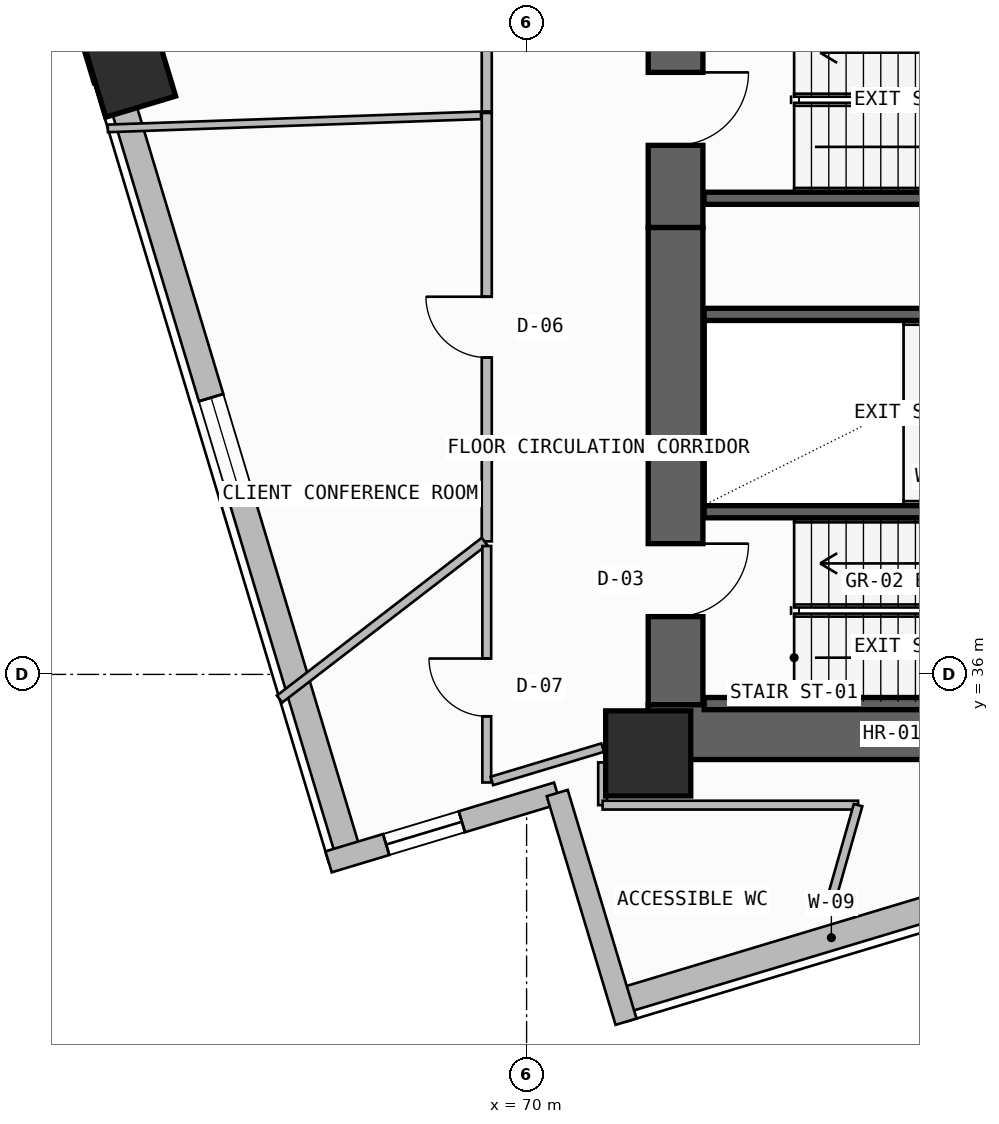
"""IFC4 building model, lengths in metres.
Left out: names, types, materials, properties, quantities, classifications, styles, units other than length and angle.
Written with IfcOpenShell. Run it as: python <this file> out.ifc"""

import sys

from ifc_helpers import new_model, si_unit, direction, frame, frame_2d, origin, origin_2d, place, context, subcontext, project, spatial, rectangle, extrude, element, fill, save


model = new_model("IFC4")
c1 = context("Model", 3, precision=1e-05, world=origin(), true_north=direction((0.0, 1.0)))
c2 = subcontext(c1, "Body", "Model", "MODEL_VIEW")
j1 = project(units=[si_unit("LENGTHUNIT", "METRE"), si_unit("PLANEANGLEUNIT", "RADIAN")], contexts=[c1])
p1 = place(None, origin())
s1 = spatial("IfcSite", under=j1, at=p1, CompositionType="ELEMENT")
p2 = place(p1, origin())
s2 = spatial("IfcBuilding", under=s1, at=p2, CompositionType="ELEMENT")
p3 = place(p2, frame((0.0, 0.0, 143.1)))
s3 = spatial("IfcBuildingStorey", under=s2, at=p3, CompositionType="ELEMENT", Elevation=143.1)
p4 = place(p3, frame((72.45, 35.5, -0.26), z_axis=(0.0, 0.0, 1.0), x_axis=(0.0, 1.0, 0.0)))
e1 = element("IfcWall", 1, at=p4, inside=s3, PredefinedType="SHEAR", context=c2, shape_type="SweptSolid", body=[
    extrude(rectangle(XDim=7.85, YDim=0.9, at=frame_2d((3.925, 0.0))), origin(), (0.0, 0.0, 1.0), 3.6),
])
p5 = place(p4, frame((1.45, 0.0, 0.26)))
e2 = element("IfcOpeningElement", 2, at=p5, cuts=e1, PredefinedType="OPENING", context=c2, shape_type="SweptSolid", body=[
    extrude(rectangle(XDim=1.2, YDim=2.2, at=frame_2d((0.6, 1.1))), frame((0.0, 0.46, 0.0), z_axis=(0.0, -1.0, 0.0), x_axis=(1.0, 0.0, 0.0)), (0.0, 0.0, 1.0), 0.92),
])
p6 = place(p3, frame((72.0, 35.05, -0.26), z_axis=(0.0, 0.0, 1.0), x_axis=(1.0, 0.0, 0.0)))
e3 = element("IfcWall", 3, at=p6, inside=s3, PredefinedType="SHEAR", context=c2, shape_type="SweptSolid", body=[
    extrude(rectangle(XDim=13.9, YDim=0.9, at=frame_2d((6.95, 0.0))), origin(), (0.0, 0.0, 1.0), 3.6),
])
p7 = place(p3, frame((72.45, 43.35, -0.26), z_axis=(0.0, 0.0, 1.0), x_axis=(0.0, 1.0, 0.0)))
e4 = element("IfcWall", 4, at=p7, inside=s3, PredefinedType="SHEAR", context=c2, shape_type="SweptSolid", body=[
    extrude(rectangle(XDim=12.7, YDim=0.9, at=frame_2d((6.35, 0.0))), origin(), (0.0, 0.0, 1.0), 3.6),
])
p8 = place(p7, frame((1.35, 0.0, 0.26)))
e5 = element("IfcOpeningElement", 5, at=p8, cuts=e4, PredefinedType="OPENING", context=c2, shape_type="SweptSolid", body=[
    extrude(rectangle(XDim=1.2, YDim=2.2, at=frame_2d((0.6, 1.1))), frame((0.0, 0.46, 0.0), z_axis=(0.0, -1.0, 0.0), x_axis=(1.0, 0.0, 0.0)), (0.0, 0.0, 1.0), 0.92),
])
p9 = place(p3, frame((72.0, 34.7, 0.0), z_axis=(0.0, 0.0, 1.0), x_axis=(1.0, 0.0, 0.0)))
e6 = element("IfcColumn", 6, at=p9, inside=s3, PredefinedType="COLUMN", context=c2, shape_type="SweptSolid", body=[
    extrude(rectangle(XDim=1.4, YDim=1.4, at=origin_2d()), origin(), (0.0, 0.0, 1.0), 3.6),
])
p10 = place(p3, frame((63.48, 45.912, 0.0), z_axis=(0.0, 0.0, 1.0), x_axis=(-0.288196268134, 0.957571360805, 0.0)))
e7 = element("IfcColumn", 7, at=p10, inside=s3, PredefinedType="COLUMN", context=c2, shape_type="SweptSolid", body=[
    extrude(rectangle(XDim=1.2, YDim=1.2, at=origin_2d()), origin(), (0.0, 0.0, 1.0), 3.6),
])
p11 = place(p3, frame((71.535, 30.624, 0.0), z_axis=(0.0, 0.0, 1.0), x_axis=(0.957571099539, 0.288197136226, 0.0)))
e8 = element("IfcWall", 8, at=p11, inside=s3, PredefinedType="SOLIDWALL", context=c2, shape_type="SweptSolid", body=[
    extrude(rectangle(XDim=12.236, YDim=0.42, at=frame_2d((6.118, 0.0))), origin(), (0.0, 0.0, 1.0), 3.34),
])
p12 = place(p11, frame((7.264, 0.0, 1.2)))
e9 = element("IfcOpeningElement", 9, at=p12, cuts=e8, PredefinedType="OPENING", context=c2, shape_type="SweptSolid", body=[
    extrude(rectangle(XDim=2.4, YDim=0.9, at=frame_2d((1.2, 0.45))), frame((0.0, 0.22, 0.0), z_axis=(0.0, -1.0, 0.0), x_axis=(1.0, 0.0, 0.0)), (0.0, 0.0, 1.0), 0.44),
])
p13 = place(p3, frame((57.323, 65.434, -0.26), z_axis=(0.0, 0.0, 1.0), x_axis=(0.288188159352, -0.957573801234, 0.0)))
e10 = element("IfcWall", 10, at=p13, inside=s3, PredefinedType="SHEAR", context=c2, shape_type="SweptSolid", body=[
    extrude(rectangle(XDim=20.469, YDim=0.7, at=frame_2d((10.234, 0.0))), origin(), (0.0, 0.0, 1.0), 3.6),
])
p14 = place(p13, frame((15.3, 0.0, 1.2)))
e11 = element("IfcOpeningElement", 11, at=p14, cuts=e10, PredefinedType="OPENING", context=c2, shape_type="SweptSolid", body=[
    extrude(rectangle(XDim=1.8, YDim=0.9, at=frame_2d((0.9, 0.45))), frame((0.0, 0.36, 0.0), z_axis=(0.0, -1.0, 0.0), x_axis=(1.0, 0.0, 0.0)), (0.0, 0.0, 1.0), 0.72),
])
p15 = place(p3, frame((63.221, 45.834, 0.0), z_axis=(0.0, 0.0, 1.0), x_axis=(0.288202962273, -0.957569346072, 0.0)))
e12 = element("IfcWall", 12, at=p15, inside=s3, PredefinedType="SOLIDWALL", context=c2, shape_type="SweptSolid", body=[
    extrude(rectangle(XDim=13.384, YDim=0.42, at=frame_2d((6.692, 0.0))), origin(), (0.0, 0.0, 1.0), 2.725),
])
p16 = place(p15, frame((5.517, 0.0, 1.2)))
e13 = element("IfcOpeningElement", 13, at=p16, cuts=e12, PredefinedType="OPENING", context=c2, shape_type="SweptSolid", body=[
    extrude(rectangle(XDim=1.8, YDim=0.9, at=frame_2d((0.9, 0.45))), frame((0.0, 0.22, 0.0), z_axis=(0.0, -1.0, 0.0), x_axis=(1.0, 0.0, 0.0)), (0.0, 0.0, 1.0), 0.44),
])
p17 = place(p3, frame((66.743, 32.917, 0.0), z_axis=(0.0, 0.0, 1.0), x_axis=(0.957584687378, 0.288151985068, 0.0)))
e14 = element("IfcWall", 14, at=p17, inside=s3, PredefinedType="SOLIDWALL", context=c2, shape_type="SweptSolid", body=[
    extrude(rectangle(XDim=3.927, YDim=0.36, at=frame_2d((1.963, 0.0))), origin(), (0.0, 0.0, 1.0), 3.34),
])
p18 = place(p17, frame((0.989, 0.0, 0.45)))
e15 = element("IfcOpeningElement", 15, at=p18, cuts=e14, PredefinedType="OPENING", context=c2, shape_type="SweptSolid", body=[
    extrude(rectangle(XDim=1.3, YDim=2.4, at=frame_2d((0.65, 1.2))), frame((0.0, 0.19, 0.0), z_axis=(0.0, -1.0, 0.0), x_axis=(1.0, 0.0, 0.0)), (0.0, 0.0, 1.0), 0.38),
])
p19 = place(p3, frame((70.504, 34.049, 0.0), z_axis=(0.0, 0.0, 1.0), x_axis=(0.288169140251, -0.957579524952, 0.0)))
e16 = element("IfcWall", 16, at=p19, inside=s3, PredefinedType="SOLIDWALL", context=c2, shape_type="SweptSolid", body=[
    extrude(rectangle(XDim=3.927, YDim=0.36, at=frame_2d((1.963, 0.0))), origin(), (0.0, 0.0, 1.0), 3.34),
])
for number, where, z_axis, x_axis in (
    (17, (72.92, 35.52, -0.26), (0.0, 0.0, 1.0), (1.0, 0.0, 0.0)),
    (18, (72.92, 38.675, -0.26), (0.0, 0.0, 1.0), (1.0, 0.0, 0.0)),
):
    element("IfcWall", number, at=place(p3, frame(where, z_axis=z_axis, x_axis=x_axis)), inside=s3, PredefinedType="SOLIDWALL", context=c2, shape_type="SweptSolid", body=[
        extrude(rectangle(XDim=7.7, YDim=0.2, at=frame_2d((3.85, 0.0))), origin(), (0.0, 0.0, 1.0), 3.6),
    ])
p20 = place(p3, frame((72.92, 41.92, -0.26), z_axis=(0.0, 0.0, 1.0), x_axis=(1.0, 0.0, 0.0)))
e19 = element("IfcWall", 19, at=p20, inside=s3, PredefinedType="SOLIDWALL", context=c2, shape_type="SweptSolid", body=[
    extrude(rectangle(XDim=7.58, YDim=0.2, at=frame_2d((3.79, 0.0))), origin(), (0.0, 0.0, 1.0), 3.6),
])
p21 = place(p3, frame((72.92, 43.83, -0.26), z_axis=(0.0, 0.0, 1.0), x_axis=(1.0, 0.0, 0.0)))
e20 = element("IfcWall", 20, at=p21, inside=s3, PredefinedType="SOLIDWALL", context=c2, shape_type="SweptSolid", body=[
    extrude(rectangle(XDim=7.7, YDim=0.2, at=frame_2d((3.85, 0.0))), origin(), (0.0, 0.0, 1.0), 3.6),
])
p22 = place(p3, frame((69.345, 45.233, 0.0), z_axis=(0.0, 0.0, 1.0), x_axis=(0.0, -1.0, 0.0)))
e21 = element("IfcWall", 21, at=p22, inside=s3, PredefinedType="PARTITIONING", context=c2, shape_type="SweptSolid", body=[
    extrude(rectangle(XDim=7.045, YDim=0.165, at=frame_2d((3.522, 0.0))), origin(), (0.0, 0.0, 1.0), 3.34),
])
p23 = place(p22, frame((3.022, 0.0, 0.0)))
e22 = element("IfcOpeningElement", 22, at=p23, cuts=e21, PredefinedType="OPENING", context=c2, shape_type="SweptSolid", body=[
    extrude(rectangle(XDim=1.0, YDim=2.2, at=frame_2d((0.5, 1.1))), frame((0.0, 0.093, 0.0), z_axis=(0.0, -1.0, 0.0), x_axis=(1.0, 0.0, 0.0)), (0.0, 0.0, 1.0), 0.185),
])
p24 = place(p3, frame((69.307, 38.188, 0.0), z_axis=(0.0, 0.0, 1.0), x_axis=(-0.792406225146, -0.609993749435, 0.0)))
e23 = element("IfcWall", 23, at=p24, inside=s3, PredefinedType="PARTITIONING", context=c2, shape_type="SweptSolid", body=[
    extrude(rectangle(XDim=4.252, YDim=0.145, at=frame_2d((2.126, 0.0))), origin(), (0.0, 0.0, 1.0), 3.34),
])
p25 = place(p3, frame((63.113, 44.979, 0.0), z_axis=(0.0, 0.0, 1.0), x_axis=(0.999389215119, 0.034945624954, 0.0)))
e24 = element("IfcWall", 24, at=p25, inside=s3, PredefinedType="PARTITIONING", context=c2, shape_type="SweptSolid", body=[
    extrude(rectangle(XDim=6.141, YDim=0.125, at=frame_2d((3.07, 0.0))), origin(), (0.0, 0.0, 1.0), 3.34),
])
p26 = place(p3, frame((69.345, 38.111, 0.0), z_axis=(0.0, 0.0, 1.0), x_axis=(0.0, -1.0, 0.0)))
e25 = element("IfcWall", 25, at=p26, inside=s3, PredefinedType="PARTITIONING", context=c2, shape_type="SweptSolid", body=[
    extrude(rectangle(XDim=3.889, YDim=0.145, at=frame_2d((1.944, 0.0))), origin(), (0.0, 0.0, 1.0), 3.34),
])
p27 = place(p26, frame((1.85, 0.0, 0.0)))
e26 = element("IfcOpeningElement", 26, at=p27, cuts=e25, PredefinedType="OPENING", context=c2, shape_type="SweptSolid", body=[
    extrude(rectangle(XDim=0.95, YDim=2.15, at=frame_2d((0.475, 1.075))), frame((0.0, 0.083, 0.0), z_axis=(0.0, -1.0, 0.0), x_axis=(1.0, 0.0, 0.0)), (0.0, 0.0, 1.0), 0.165),
])
p28 = place(p3, frame((69.429, 34.248, 0.0), z_axis=(0.0, 0.0, 1.0), x_axis=(0.957582071772, 0.28816067709, 0.0)))
e27 = element("IfcWall", 27, at=p28, inside=s3, PredefinedType="PARTITIONING", context=c2, shape_type="SweptSolid", body=[
    extrude(rectangle(XDim=1.901, YDim=0.145, at=frame_2d((0.951, 0.0))), origin(), (0.0, 0.0, 1.0), 3.34),
])
p29 = place(p3, frame((69.345, 51.927, 0.0), z_axis=(0.0, 0.0, 1.0), x_axis=(0.0, -1.0, 0.0)))
e28 = element("IfcWall", 28, at=p29, inside=s3, PredefinedType="PARTITIONING", context=c2, shape_type="SweptSolid", body=[
    extrude(rectangle(XDim=6.67, YDim=0.165, at=frame_2d((3.335, 0.0))), origin(), (0.0, 0.0, 1.0), 2.725),
])
p30 = place(p29, frame((2.835, 0.0, 0.0)))
e29 = element("IfcOpeningElement", 29, at=p30, cuts=e28, PredefinedType="OPENING", context=c2, shape_type="SweptSolid", body=[
    extrude(rectangle(XDim=1.0, YDim=2.2, at=frame_2d((0.5, 1.1))), frame((0.0, 0.093, 0.0), z_axis=(0.0, -1.0, 0.0), x_axis=(1.0, 0.0, 0.0)), (0.0, 0.0, 1.0), 0.185),
])
p31 = place(p3, frame((71.25, 34.553, 0.0), z_axis=(0.0, 0.0, 1.0), x_axis=(0.0, -1.0, 0.0)))
e30 = element("IfcWall", 30, at=p31, inside=s3, PredefinedType="PARTITIONING", context=c2, shape_type="SweptSolid", body=[
    extrude(rectangle(XDim=0.703, YDim=0.145, at=frame_2d((0.351, 0.0))), origin(), (0.0, 0.0, 1.0), 3.34),
])
p32 = place(p3, frame((71.25, 33.85, 0.0), z_axis=(0.0, 0.0, 1.0), x_axis=(1.0, 0.0, 0.0)))
e31 = element("IfcWall", 31, at=p32, inside=s3, PredefinedType="PARTITIONING", context=c2, shape_type="SweptSolid", body=[
    extrude(rectangle(XDim=4.201, YDim=0.145, at=frame_2d((2.101, 0.0))), origin(), (0.0, 0.0, 1.0), 3.34),
])
p33 = place(p3, frame((75.451, 33.85, 0.0), z_axis=(0.0, 0.0, 1.0), x_axis=(-0.273017128242, -0.96200917235, 0.0)))
e32 = element("IfcWall", 32, at=p33, inside=s3, PredefinedType="PARTITIONING", context=c2, shape_type="SweptSolid", body=[
    extrude(rectangle(XDim=1.817, YDim=0.145, at=frame_2d((0.909, 0.0))), origin(), (0.0, 0.0, 1.0), 3.34),
])
p34 = place(p16, origin())
e33 = element("IfcWindow", 33, at=p34, inside=s3, PartitioningType="SINGLE_PANEL", PredefinedType="WINDOW", context=c2, shape_type="SweptSolid", body=[
    extrude(rectangle(XDim=1.8, YDim=0.9, at=frame_2d((0.9, 0.45))), frame((0.0, 0.03, 0.0), z_axis=(0.0, -1.0, 0.0), x_axis=(1.0, 0.0, 0.0)), (0.0, 0.0, 1.0), 0.06),
])
fill(e13, e33)
p35 = place(p18, origin())
e34 = element("IfcWindow", 34, at=p35, inside=s3, PartitioningType="SINGLE_PANEL", PredefinedType="WINDOW", context=c2, shape_type="SweptSolid", body=[
    extrude(rectangle(XDim=1.3, YDim=2.4, at=frame_2d((0.65, 1.2))), frame((0.0, 0.03, 0.0), z_axis=(0.0, -1.0, 0.0), x_axis=(1.0, 0.0, 0.0)), (0.0, 0.0, 1.0), 0.06),
])
fill(e15, e34)
p36 = place(p5, frame((1.2, 0.0, 0.0), z_axis=(0.0, 0.0, 1.0), x_axis=(-1.0, 0.0, 0.0)))
e35 = element("IfcDoor", 35, at=p36, inside=s3, OperationType="SINGLE_SWING_LEFT", PredefinedType="USERDEFINED", context=c2, shape_type="SweptSolid", body=[
    extrude(rectangle(XDim=1.2, YDim=2.2, at=frame_2d((0.6, 1.1))), frame((0.0, 0.025, 0.0), z_axis=(0.0, -1.0, 0.0), x_axis=(1.0, 0.0, 0.0)), (0.0, 0.0, 1.0), 0.05),
])
fill(e2, e35)
p37 = place(p8, frame((1.2, 0.0, 0.0), z_axis=(0.0, 0.0, 1.0), x_axis=(-1.0, 0.0, 0.0)))
e36 = element("IfcDoor", 36, at=p37, inside=s3, OperationType="SINGLE_SWING_LEFT", PredefinedType="USERDEFINED", context=c2, shape_type="SweptSolid", body=[
    extrude(rectangle(XDim=1.2, YDim=2.2, at=frame_2d((0.6, 1.1))), frame((0.0, 0.025, 0.0), z_axis=(0.0, -1.0, 0.0), x_axis=(1.0, 0.0, 0.0)), (0.0, 0.0, 1.0), 0.05),
])
fill(e5, e36)
p38 = place(p23, frame((1.0, 0.0, 0.0), z_axis=(0.0, 0.0, 1.0), x_axis=(-1.0, 0.0, 0.0)))
e37 = element("IfcDoor", 37, at=p38, inside=s3, OperationType="SINGLE_SWING_RIGHT", PredefinedType="DOOR", context=c2, shape_type="SweptSolid", body=[
    extrude(rectangle(XDim=1.0, YDim=2.2, at=frame_2d((0.5, 1.1))), frame((0.0, 0.025, 0.0), z_axis=(0.0, -1.0, 0.0), x_axis=(1.0, 0.0, 0.0)), (0.0, 0.0, 1.0), 0.05),
])
fill(e22, e37)
p39 = place(p27, frame((0.95, 0.0, 0.0), z_axis=(0.0, 0.0, 1.0), x_axis=(-1.0, 0.0, 0.0)))
e38 = element("IfcDoor", 38, at=p39, inside=s3, OperationType="SINGLE_SWING_RIGHT", PredefinedType="DOOR", context=c2, shape_type="SweptSolid", body=[
    extrude(rectangle(XDim=0.95, YDim=2.15, at=frame_2d((0.475, 1.075))), frame((0.0, 0.025, 0.0), z_axis=(0.0, -1.0, 0.0), x_axis=(1.0, 0.0, 0.0)), (0.0, 0.0, 1.0), 0.05),
])
fill(e26, e38)
save(model, sys.argv[1])
